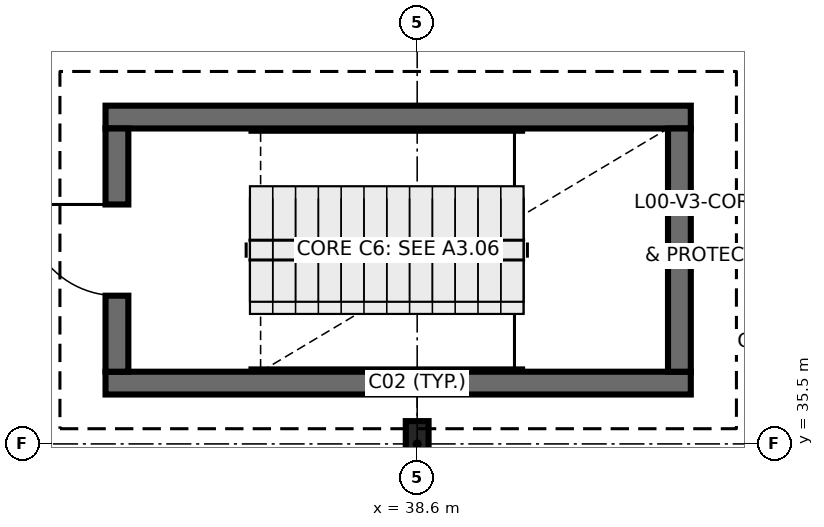
"""IFC4 building model, lengths in metres.
Left out: names, types, materials, properties, quantities, classifications, styles, units other than length and angle.
Written with IfcOpenShell. Run it as: python <this file> out.ifc"""

import sys

from ifc_helpers import new_model, si_unit, direction, frame, frame_2d, origin, origin_2d, place, context, subcontext, project, spatial, rectangle, i_section, extrude, element, fill, save


model = new_model("IFC4")
c1 = context("Model", 3, precision=1e-05, world=origin(), true_north=direction((0.0, 1.0)))
c2 = subcontext(c1, "Body", "Model", "MODEL_VIEW")
j1 = project(units=[si_unit("LENGTHUNIT", "METRE"), si_unit("PLANEANGLEUNIT", "RADIAN")], contexts=[c1])
p1 = place(None, origin())
s1 = spatial("IfcSite", under=j1, at=p1, CompositionType="ELEMENT")
p2 = place(p1, origin())
s2 = spatial("IfcBuilding", under=s1, at=p2, CompositionType="ELEMENT")
p3 = place(p2, origin())
s3 = spatial("IfcBuildingStorey", under=s2, at=p3, CompositionType="ELEMENT", Elevation=0.0)
p4 = place(p3, frame((38.6, 35.5, 0.0), z_axis=(0.0, 0.0, 1.0), x_axis=(1.0, 0.0, 0.0)))
e1 = element("IfcColumn", 1, at=p4, inside=s3, PredefinedType="COLUMN", context=c2, shape_type="SweptSolid", body=[
    extrude(i_section(OverallWidth=0.3, OverallDepth=0.6, WebThickness=0.015, FlangeThickness=0.03, FilletRadius=0.027, at=origin_2d()), origin(), (0.0, 0.0, 1.0), 4.8),
])
for number, where, z_axis, x_axis in (
    (2, (34.5, 36.3, 0.0), (0.0, 0.0, 1.0), (1.0, 0.0, 0.0)),
    (3, (42.2, 39.8, 0.0), (0.0, 0.0, 1.0), (-1.0, 0.0, 0.0)),
):
    element("IfcWall", number, at=place(p3, frame(where, z_axis=z_axis, x_axis=x_axis)), inside=s3, PredefinedType="SHEAR", context=c2, shape_type="SweptSolid", body=[
        extrude(rectangle(XDim=7.7, YDim=0.3, at=frame_2d((3.85, 0.0))), origin(), (0.0, 0.0, 1.0), 4.8),
    ])
p5 = place(p3, frame((34.65, 39.65, 0.0), z_axis=(0.0, 0.0, 1.0), x_axis=(0.0, -1.0, 0.0)))
e4 = element("IfcWall", 4, at=p5, inside=s3, PredefinedType="SHEAR", context=c2, shape_type="SweptSolid", body=[
    extrude(rectangle(XDim=3.2, YDim=0.3, at=frame_2d((1.6, 0.0))), origin(), (0.0, 0.0, 1.0), 4.8),
])
p6 = place(p5, frame((1.0, 0.0, 0.0)))
e5 = element("IfcOpeningElement", 5, at=p6, cuts=e4, PredefinedType="OPENING", context=c2, shape_type="SweptSolid", body=[
    extrude(rectangle(XDim=1.2, YDim=2.15, at=frame_2d((0.6, 1.075))), frame((0.0, 0.16, 0.0), z_axis=(0.0, -1.0, 0.0), x_axis=(1.0, 0.0, 0.0)), (0.0, 0.0, 1.0), 0.32),
])
p7 = place(p3, frame((42.05, 36.45, 0.0), z_axis=(0.0, 0.0, 1.0), x_axis=(0.0, 1.0, 0.0)))
e6 = element("IfcWall", 6, at=p7, inside=s3, PredefinedType="SHEAR", context=c2, shape_type="SweptSolid", body=[
    extrude(rectangle(XDim=3.2, YDim=0.3, at=frame_2d((1.6, 0.0))), origin(), (0.0, 0.0, 1.0), 4.8),
])
p8 = place(p6, frame((1.2, 0.0, 0.0), z_axis=(0.0, 0.0, 1.0), x_axis=(-1.0, 0.0, 0.0)))
e7 = element("IfcDoor", 7, at=p8, inside=s3, OperationType="SINGLE_SWING_LEFT", PredefinedType="DOOR", context=c2, shape_type="SweptSolid", body=[
    extrude(rectangle(XDim=1.2, YDim=2.15, at=frame_2d((0.6, 1.075))), frame((0.0, 0.025, 0.0), z_axis=(0.0, -1.0, 0.0), x_axis=(1.0, 0.0, 0.0)), (0.0, 0.0, 1.0), 0.05),
])
fill(e5, e7)
save(model, sys.argv[1])
